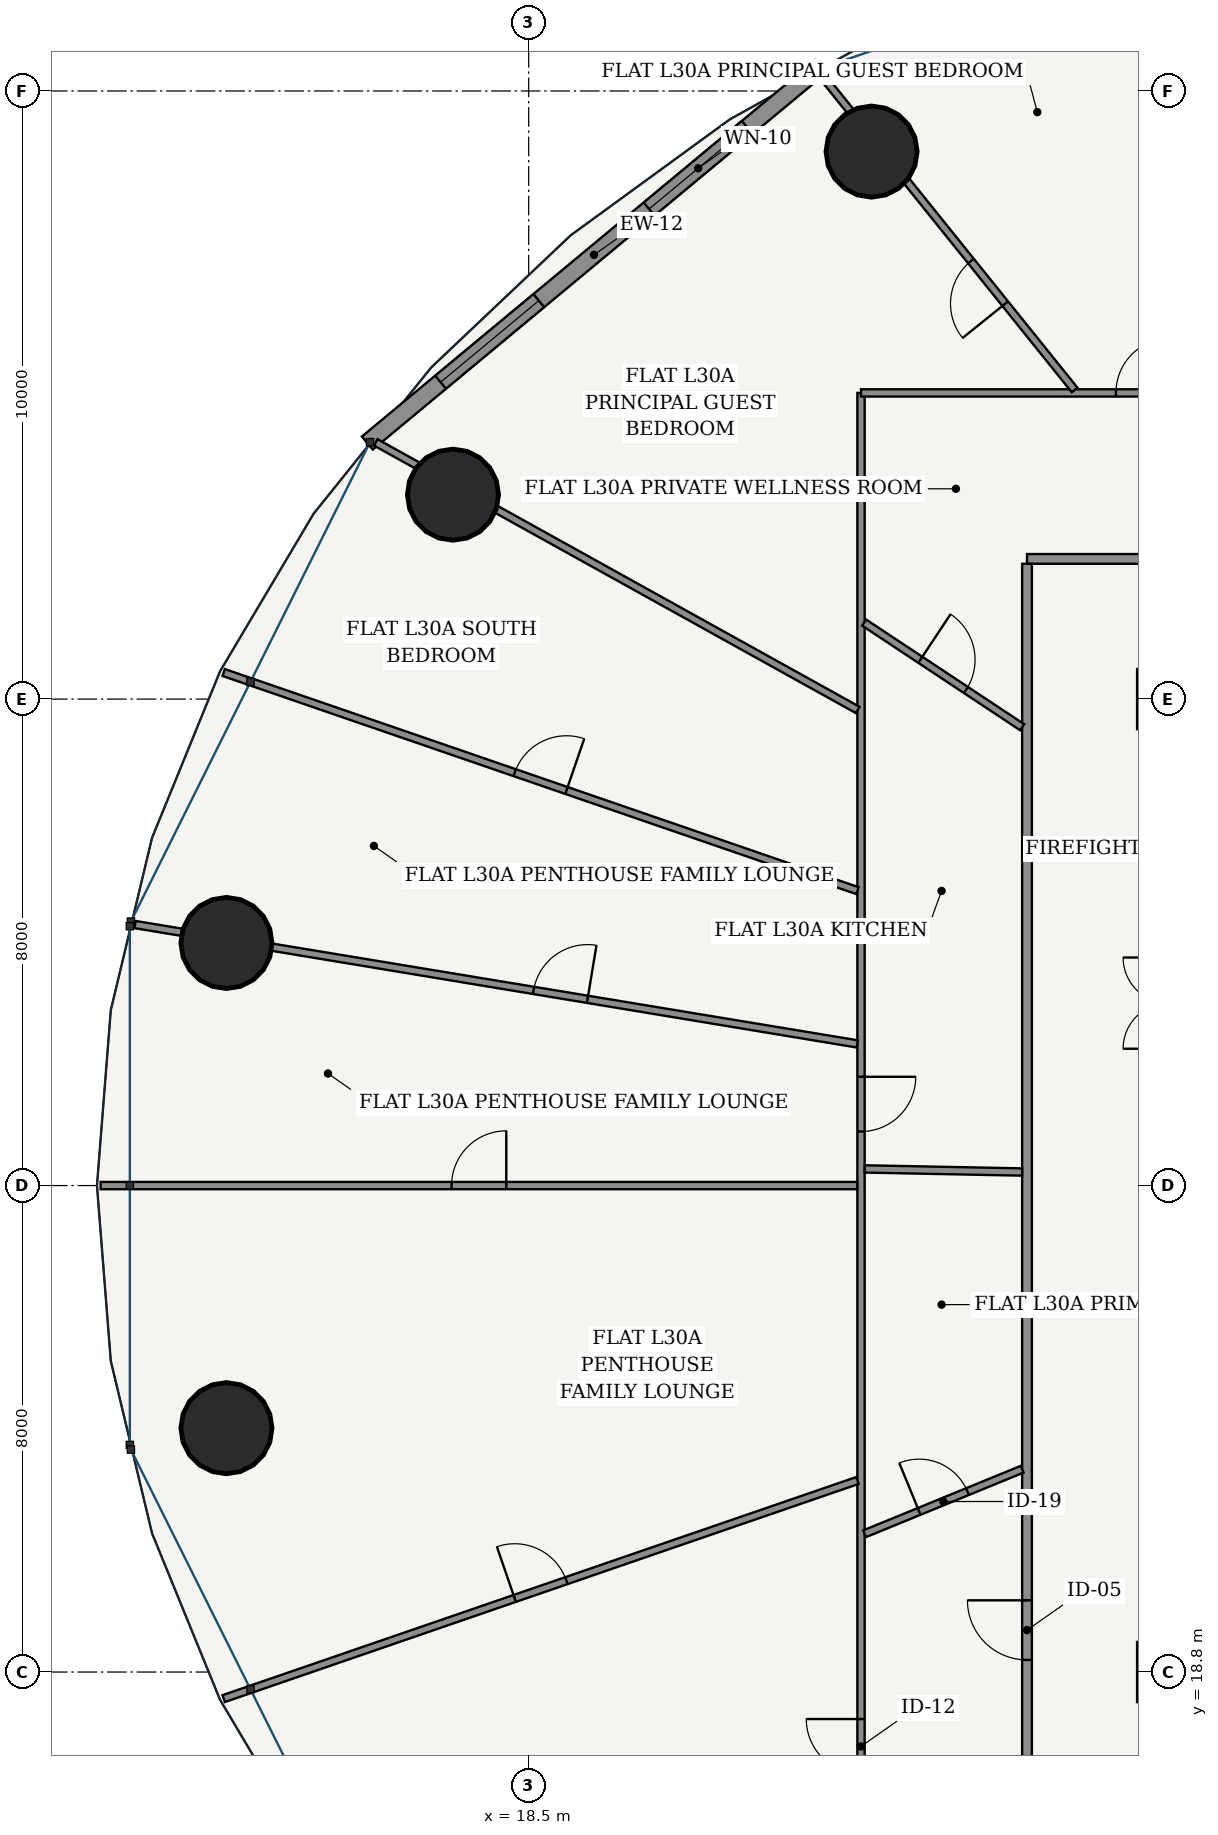
"""IFC4 building model, lengths in metres.
Left out: names, types, materials, properties, quantities, classifications, styles, units other than length and angle.
Written with IfcOpenShell. Run it as: python <this file> out.ifc"""

import sys

from ifc_helpers import new_model, si_unit, direction, frame, frame_2d, origin, origin_2d, place, context, subcontext, project, spatial, rectangle, hollow_circle, extrude, source, transform, mapped, element, fill, save


model = new_model("IFC4")
c1 = context("Model", 3, precision=1e-05, world=origin(), true_north=direction((-0.2419218956, 0.970295726276)))
c2 = subcontext(c1, "Body", "Model", "MODEL_VIEW")
j1 = project(units=[si_unit("LENGTHUNIT", "METRE"), si_unit("PLANEANGLEUNIT", "RADIAN")], contexts=[c1])
p1 = place(None, origin())
s1 = spatial("IfcSite", under=j1, at=p1, CompositionType="ELEMENT")
p2 = place(p1, origin())
s2 = spatial("IfcBuilding", under=s1, at=p2, CompositionType="ELEMENT")
p3 = place(p2, frame((0.0, 0.0, 115.8)))
s3 = spatial("IfcBuildingStorey", under=s2, at=p3, CompositionType="ELEMENT", Elevation=115.8)
for number, where, z_axis, x_axis in (
    (1, (24.138, 43.803, 0.0), (0.0, 0.0, 1.0), (1.0, 0.0, 0.0)),
    (2, (17.255, 38.161, 0.0), (0.0, 0.0, 1.0), (1.0, 0.0, 0.0)),
    (3, (13.529, 30.79, 0.0), (0.0, 0.0, 1.0), (1.0, 0.0, 0.0)),
    (4, (13.529, 22.81, 0.0), (0.0, 0.0, 1.0), (1.0, 0.0, 0.0)),
):
    element("IfcColumn", number, at=place(p3, frame(where, z_axis=z_axis, x_axis=x_axis)), inside=s3, PredefinedType="COLUMN", context=c2, shape_type="SweptSolid", body=[
        extrude(hollow_circle(Radius=0.75, WallThickness=0.045, at=origin_2d()), origin(), (0.0, 0.0, 1.0), 3.6),
    ])
p4 = place(p3, frame((23.3, 45.202, 0.0), z_axis=(0.0, 0.0, 1.0), x_axis=(-0.769242574941, -0.638956853706, 0.0)))
e5 = element("IfcWall", 5, at=p4, inside=s3, PredefinedType="SOLIDWALL", context=c2, shape_type="SweptSolid", body=[
    extrude(rectangle(XDim=9.69, YDim=0.28, at=frame_2d((4.845, 0.0))), origin(), (0.0, 0.0, 1.0), 3.325),
])
p5 = place(p4, frame((1.566, 0.0, 0.85)))
e6 = element("IfcOpeningElement", 6, at=p5, cuts=e5, PredefinedType="OPENING", context=c2, shape_type="SweptSolid", body=[
    extrude(rectangle(XDim=2.1, YDim=1.95, at=frame_2d((1.05, 0.975))), frame((0.0, 0.15, 0.0), z_axis=(0.0, -1.0, 0.0), x_axis=(1.0, 0.0, 0.0)), (0.0, 0.0, 1.0), 0.3),
])
p6 = place(p4, frame((6.023, 0.0, 0.85)))
e7 = element("IfcOpeningElement", 7, at=p6, cuts=e5, PredefinedType="OPENING", context=c2, shape_type="SweptSolid", body=[
    extrude(rectangle(XDim=2.1, YDim=1.95, at=frame_2d((1.05, 0.975))), frame((0.0, 0.15, 0.0), z_axis=(0.0, -1.0, 0.0), x_axis=(1.0, 0.0, 0.0)), (0.0, 0.0, 1.0), 0.3),
])
p7 = place(p3, frame((26.695, 37.105, 0.0), z_axis=(0.0, 0.0, 1.0), x_axis=(1.0, 0.0, 0.0)))
e8 = element("IfcWall", 8, at=p7, inside=s3, PredefinedType="PARTITIONING", context=c2, shape_type="SweptSolid", body=[
    extrude(rectangle(XDim=22.61, YDim=0.16, at=frame_2d((11.305, 0.0))), origin(), (0.0, 0.0, 1.0), 2.767),
])
p8 = place(p3, frame((26.695, 16.575, 0.0), z_axis=(0.0, 0.0, 1.0), x_axis=(0.0, 1.0, 0.0)))
e9 = element("IfcWall", 9, at=p8, inside=s3, PredefinedType="PARTITIONING", context=c2, shape_type="SweptSolid", body=[
    extrude(rectangle(XDim=20.45, YDim=0.16, at=frame_2d((10.225, 0.0))), origin(), (0.0, 0.0, 1.0), 2.767),
])
p9 = place(p8, frame((2.424, 0.0, 0.0)))
e10 = element("IfcOpeningElement", 10, at=p9, cuts=e9, PredefinedType="OPENING", context=c2, shape_type="SweptSolid", body=[
    extrude(rectangle(XDim=0.98, YDim=2.2, at=frame_2d((0.49, 1.1))), frame((0.0, 0.09, 0.0), z_axis=(0.0, -1.0, 0.0), x_axis=(1.0, 0.0, 0.0)), (0.0, 0.0, 1.0), 0.18),
])
p10 = place(p3, frame((23.965, 13.765, 0.0), z_axis=(0.0, 0.0, 1.0), x_axis=(0.0, 1.0, 0.0)))
e11 = element("IfcWall", 11, at=p10, inside=s3, PredefinedType="PARTITIONING", context=c2, shape_type="SweptSolid", body=[
    extrude(rectangle(XDim=26.07, YDim=0.12, at=frame_2d((13.035, 0.0))), origin(), (0.0, 0.0, 1.0), 2.767),
])
p11 = place(p10, frame((3.362, 0.0, 0.0)))
e12 = element("IfcOpeningElement", 12, at=p11, cuts=e11, PredefinedType="OPENING", context=c2, shape_type="SweptSolid", body=[
    extrude(rectangle(XDim=0.9, YDim=2.15, at=frame_2d((0.45, 1.075))), frame((0.0, 0.07, 0.0), z_axis=(0.0, -1.0, 0.0), x_axis=(1.0, 0.0, 0.0)), (0.0, 0.0, 1.0), 0.14),
])
p12 = place(p10, frame((13.924, 0.0, 0.0)))
e13 = element("IfcOpeningElement", 13, at=p12, cuts=e11, PredefinedType="OPENING", context=c2, shape_type="SweptSolid", body=[
    extrude(rectangle(XDim=0.9, YDim=2.15, at=frame_2d((0.45, 1.075))), frame((0.0, 0.07, 0.0), z_axis=(0.0, -1.0, 0.0), x_axis=(1.0, 0.0, 0.0)), (0.0, 0.0, 1.0), 0.14),
])
p13 = place(p3, frame((23.965, 39.835, 0.0), z_axis=(0.0, 0.0, 1.0), x_axis=(1.0, 0.0, 0.0)))
e14 = element("IfcWall", 14, at=p13, inside=s3, PredefinedType="PARTITIONING", context=c2, shape_type="SweptSolid", body=[
    extrude(rectangle(XDim=24.416, YDim=0.12, at=frame_2d((12.208, 0.0))), origin(), (0.0, 0.0, 1.0), 2.767),
])
p14 = place(p13, frame((4.192, 0.0, 0.0)))
e15 = element("IfcOpeningElement", 15, at=p14, cuts=e14, PredefinedType="OPENING", context=c2, shape_type="SweptSolid", body=[
    extrude(rectangle(XDim=0.9, YDim=2.15, at=frame_2d((0.45, 1.075))), frame((0.0, 0.07, 0.0), z_axis=(0.0, -1.0, 0.0), x_axis=(1.0, 0.0, 0.0)), (0.0, 0.0, 1.0), 0.14),
])
p15 = place(p13, frame((19.728, 0.0, 0.0)))
e16 = element("IfcOpeningElement", 16, at=p15, cuts=e14, PredefinedType="OPENING", context=c2, shape_type="SweptSolid", body=[
    extrude(rectangle(XDim=0.86, YDim=2.15, at=frame_2d((0.43, 1.075))), frame((0.0, 0.07, 0.0), z_axis=(0.0, -1.0, 0.0), x_axis=(1.0, 0.0, 0.0)), (0.0, 0.0, 1.0), 0.14),
])
p16 = place(p3, frame((31.474, 39.89, 0.0), z_axis=(0.0, 0.0, 1.0), x_axis=(-0.446167584581, 0.894949432353, 0.0)))
e17 = element("IfcWall", 17, at=p16, inside=s3, PredefinedType="PARTITIONING", context=c2, shape_type="SweptSolid", body=[
    extrude(rectangle(XDim=8.125, YDim=0.12, at=frame_2d((4.062, 0.0))), origin(), (0.0, 0.0, 1.0), 2.767),
])
p17 = place(p16, frame((3.612, 0.0, 0.0)))
e18 = element("IfcOpeningElement", 18, at=p17, cuts=e17, PredefinedType="OPENING", context=c2, shape_type="SweptSolid", body=[
    extrude(rectangle(XDim=0.9, YDim=2.15, at=frame_2d((0.45, 1.075))), frame((0.0, 0.07, 0.0), z_axis=(0.0, -1.0, 0.0), x_axis=(1.0, 0.0, 0.0)), (0.0, 0.0, 1.0), 0.14),
])
p18 = place(p3, frame((27.478, 39.883, 0.0), z_axis=(0.0, 0.0, 1.0), x_axis=(-0.62672583251, 0.779239841682, 0.0)))
e19 = element("IfcWall", 19, at=p18, inside=s3, PredefinedType="PARTITIONING", context=c2, shape_type="SweptSolid", body=[
    extrude(rectangle(XDim=6.678, YDim=0.12, at=frame_2d((3.339, 0.0))), origin(), (0.0, 0.0, 1.0), 2.767),
])
p19 = place(p18, frame((1.821, 0.0, 0.0)))
e20 = element("IfcOpeningElement", 20, at=p19, cuts=e19, PredefinedType="OPENING", context=c2, shape_type="SweptSolid", body=[
    extrude(rectangle(XDim=0.9, YDim=2.15, at=frame_2d((0.45, 1.075))), frame((0.0, 0.07, 0.0), z_axis=(0.0, -1.0, 0.0), x_axis=(1.0, 0.0, 0.0)), (0.0, 0.0, 1.0), 0.14),
])
p20 = place(p3, frame((23.911, 34.622, 0.0), z_axis=(0.0, 0.0, 1.0), x_axis=(-0.874324904351, 0.485341077626, 0.0)))
e21 = element("IfcWall", 21, at=p20, inside=s3, PredefinedType="PARTITIONING", context=c2, shape_type="SweptSolid", body=[
    extrude(rectangle(XDim=9.066, YDim=0.12, at=frame_2d((4.533, 0.0))), origin(), (0.0, 0.0, 1.0), 2.767),
])
p21 = place(p3, frame((23.906, 31.65, 0.0), z_axis=(0.0, 0.0, 1.0), x_axis=(-0.945573120726, 0.32540970078, 0.0)))
e22 = element("IfcWall", 22, at=p21, inside=s3, PredefinedType="PARTITIONING", context=c2, shape_type="SweptSolid", body=[
    extrude(rectangle(XDim=11.022, YDim=0.12, at=frame_2d((5.511, 0.0))), origin(), (0.0, 0.0, 1.0), 2.767),
])
p22 = place(p21, frame((5.061, 0.0, 0.0)))
e23 = element("IfcOpeningElement", 23, at=p22, cuts=e22, PredefinedType="OPENING", context=c2, shape_type="SweptSolid", body=[
    extrude(rectangle(XDim=0.9, YDim=2.15, at=frame_2d((0.45, 1.075))), frame((0.0, 0.07, 0.0), z_axis=(0.0, -1.0, 0.0), x_axis=(1.0, 0.0, 0.0)), (0.0, 0.0, 1.0), 0.14),
])
p23 = place(p3, frame((23.904, 29.13, 0.0), z_axis=(0.0, 0.0, 1.0), x_axis=(-0.986618264768, 0.163047231274, 0.0)))
e24 = element("IfcWall", 24, at=p23, inside=s3, PredefinedType="PARTITIONING", context=c2, shape_type="SweptSolid", body=[
    extrude(rectangle(XDim=12.039, YDim=0.12, at=frame_2d((6.02, 0.0))), origin(), (0.0, 0.0, 1.0), 2.767),
])
p24 = place(p23, frame((4.496, 0.0, 0.0)))
e25 = element("IfcOpeningElement", 25, at=p24, cuts=e24, PredefinedType="OPENING", context=c2, shape_type="SweptSolid", body=[
    extrude(rectangle(XDim=0.9, YDim=2.15, at=frame_2d((0.45, 1.075))), frame((0.0, 0.07, 0.0), z_axis=(0.0, -1.0, 0.0), x_axis=(1.0, 0.0, 0.0)), (0.0, 0.0, 1.0), 0.14),
])
p25 = place(p3, frame((23.903, 26.8, 0.0), z_axis=(0.0, 0.0, 1.0), x_axis=(-1.0, 0.0, 0.0)))
e26 = element("IfcWall", 26, at=p25, inside=s3, PredefinedType="PARTITIONING", context=c2, shape_type="SweptSolid", body=[
    extrude(rectangle(XDim=12.443, YDim=0.12, at=frame_2d((6.222, 0.0))), origin(), (0.0, 0.0, 1.0), 2.767),
])
p26 = place(p25, frame((5.771, 0.0, 0.0)))
e27 = element("IfcOpeningElement", 27, at=p26, cuts=e26, PredefinedType="OPENING", context=c2, shape_type="SweptSolid", body=[
    extrude(rectangle(XDim=0.9, YDim=2.15, at=frame_2d((0.45, 1.075))), frame((0.0, 0.07, 0.0), z_axis=(0.0, -1.0, 0.0), x_axis=(1.0, 0.0, 0.0)), (0.0, 0.0, 1.0), 0.14),
])
p27 = place(p3, frame((23.906, 21.95, 0.0), z_axis=(0.0, 0.0, 1.0), x_axis=(-0.945573120726, -0.32540970078, 0.0)))
e28 = element("IfcWall", 28, at=p27, inside=s3, PredefinedType="PARTITIONING", context=c2, shape_type="SweptSolid", body=[
    extrude(rectangle(XDim=11.022, YDim=0.12, at=frame_2d((5.511, 0.0))), origin(), (0.0, 0.0, 1.0), 2.767),
])
p28 = place(p27, frame((5.061, 0.0, 0.0)))
e29 = element("IfcOpeningElement", 29, at=p28, cuts=e28, PredefinedType="OPENING", context=c2, shape_type="SweptSolid", body=[
    extrude(rectangle(XDim=0.9, YDim=2.15, at=frame_2d((0.45, 1.075))), frame((0.0, 0.07, 0.0), z_axis=(0.0, -1.0, 0.0), x_axis=(1.0, 0.0, 0.0)), (0.0, 0.0, 1.0), 0.14),
])
p29 = place(p3, frame((26.615, 34.337, 0.0), z_axis=(0.0, 0.0, 1.0), x_axis=(-0.833829855758, 0.552021531868, 0.0)))
e30 = element("IfcWall", 30, at=p29, inside=s3, PredefinedType="PARTITIONING", context=c2, shape_type="SweptSolid", body=[
    extrude(rectangle(XDim=3.116, YDim=0.12, at=frame_2d((1.558, 0.0))), origin(), (0.0, 0.0, 1.0), 3.325),
])
p30 = place(p29, frame((1.108, 0.0, 0.0)))
e31 = element("IfcOpeningElement", 31, at=p30, cuts=e30, PredefinedType="OPENING", context=c2, shape_type="SweptSolid", body=[
    extrude(rectangle(XDim=0.9, YDim=2.15, at=frame_2d((0.45, 1.075))), frame((0.0, 0.07, 0.0), z_axis=(0.0, -1.0, 0.0), x_axis=(1.0, 0.0, 0.0)), (0.0, 0.0, 1.0), 0.14),
])
p31 = place(p3, frame((26.615, 27.023, 0.0), z_axis=(0.0, 0.0, 1.0), x_axis=(-0.999809377232, 0.019524579348, 0.0)))
e32 = element("IfcWall", 32, at=p31, inside=s3, PredefinedType="PARTITIONING", context=c2, shape_type="SweptSolid", body=[
    extrude(rectangle(XDim=2.588, YDim=0.12, at=frame_2d((1.294, 0.0))), origin(), (0.0, 0.0, 1.0), 3.325),
])
p32 = place(p3, frame((26.615, 22.135, 0.0), z_axis=(0.0, 0.0, 1.0), x_axis=(-0.925337216259, -0.379145138708, 0.0)))
e33 = element("IfcWall", 33, at=p32, inside=s3, PredefinedType="PARTITIONING", context=c2, shape_type="SweptSolid", body=[
    extrude(rectangle(XDim=2.802, YDim=0.12, at=frame_2d((1.401, 0.0))), origin(), (0.0, 0.0, 1.0), 3.325),
])
p33 = place(p32, frame((0.971, 0.0, 0.0)))
e34 = element("IfcOpeningElement", 34, at=p33, cuts=e33, PredefinedType="OPENING", context=c2, shape_type="SweptSolid", body=[
    extrude(rectangle(XDim=0.86, YDim=2.15, at=frame_2d((0.43, 1.075))), frame((0.0, 0.07, 0.0), z_axis=(0.0, -1.0, 0.0), x_axis=(1.0, 0.0, 0.0)), (0.0, 0.0, 1.0), 0.14),
])
m1 = source(origin(), c2, "Body", "SweptSolid", [
    extrude(rectangle(XDim=2.1, YDim=1.95, at=frame_2d((1.05, 0.975))), frame((0.0, 0.03, 0.0), z_axis=(0.0, -1.0, 0.0), x_axis=(1.0, 0.0, 0.0)), (0.0, 0.0, 1.0), 0.06),
])
p34 = place(p5, origin())
e35 = element("IfcWindow", 35, at=p34, inside=s3, PartitioningType="SINGLE_PANEL", PredefinedType="WINDOW", context=c2, shape_type="MappedRepresentation", body=[
    mapped(m1, transform((0.0, 0.0, 0.0), scale=1.0)),
])
fill(e6, e35)
p35 = place(p6, origin())
e36 = element("IfcWindow", 36, at=p35, inside=s3, PartitioningType="SINGLE_PANEL", PredefinedType="WINDOW", context=c2, shape_type="MappedRepresentation", body=[
    mapped(m1, transform((0.0, 0.0, 0.0), scale=1.0)),
])
fill(e7, e36)
m2 = source(origin(), c2, "Body", "SweptSolid", [
    extrude(rectangle(XDim=0.98, YDim=2.2, at=frame_2d((0.49, 1.1))), frame((0.0, 0.025, 0.0), z_axis=(0.0, -1.0, 0.0), x_axis=(1.0, 0.0, 0.0)), (0.0, 0.0, 1.0), 0.05),
])
p36 = place(p9, origin())
e37 = element("IfcDoor", 37, at=p36, inside=s3, OperationType="SINGLE_SWING_RIGHT", PredefinedType="DOOR", context=c2, shape_type="MappedRepresentation", body=[
    mapped(m2, transform((0.0, 0.0, 0.0), scale=1.0)),
])
fill(e10, e37)
m3 = source(origin(), c2, "Body", "SweptSolid", [
    extrude(rectangle(XDim=0.86, YDim=2.15, at=frame_2d((0.43, 1.075))), frame((0.0, 0.025, 0.0), z_axis=(0.0, -1.0, 0.0), x_axis=(1.0, 0.0, 0.0)), (0.0, 0.0, 1.0), 0.05),
])
p37 = place(p33, frame((0.86, 0.0, 0.0), z_axis=(0.0, 0.0, 1.0), x_axis=(-1.0, 0.0, 0.0)))
e38 = element("IfcDoor", 38, at=p37, inside=s3, OperationType="SINGLE_SWING_LEFT", PredefinedType="DOOR", context=c2, shape_type="MappedRepresentation", body=[
    mapped(m3, transform((0.0, 0.0, 0.0), scale=1.0)),
])
fill(e34, e38)
m4 = source(origin(), c2, "Body", "SweptSolid", [
    extrude(rectangle(XDim=0.9, YDim=2.15, at=frame_2d((0.45, 1.075))), frame((0.0, 0.025, 0.0), z_axis=(0.0, -1.0, 0.0), x_axis=(1.0, 0.0, 0.0)), (0.0, 0.0, 1.0), 0.05),
])
p38 = place(p11, origin())
e39 = element("IfcDoor", 39, at=p38, inside=s3, OperationType="SINGLE_SWING_RIGHT", PredefinedType="DOOR", context=c2, shape_type="MappedRepresentation", body=[
    mapped(m4, transform((0.0, 0.0, 0.0), scale=1.0)),
])
fill(e12, e39)
p39 = place(p28, frame((0.9, 0.0, 0.0), z_axis=(0.0, 0.0, 1.0), x_axis=(-1.0, 0.0, 0.0)))
e40 = element("IfcDoor", 40, at=p39, inside=s3, OperationType="SINGLE_SWING_LEFT", PredefinedType="DOOR", context=c2, shape_type="MappedRepresentation", body=[
    mapped(m4, transform((0.0, 0.0, 0.0), scale=1.0)),
])
fill(e29, e40)
p40 = place(p26, frame((0.9, 0.0, 0.0), z_axis=(0.0, 0.0, 1.0), x_axis=(-1.0, 0.0, 0.0)))
e41 = element("IfcDoor", 41, at=p40, inside=s3, OperationType="SINGLE_SWING_RIGHT", PredefinedType="DOOR", context=c2, shape_type="MappedRepresentation", body=[
    mapped(m4, transform((0.0, 0.0, 0.0), scale=1.0)),
])
fill(e27, e41)
p41 = place(p12, frame((0.9, 0.0, 0.0), z_axis=(0.0, 0.0, 1.0), x_axis=(-1.0, 0.0, 0.0)))
e42 = element("IfcDoor", 42, at=p41, inside=s3, OperationType="SINGLE_SWING_LEFT", PredefinedType="DOOR", context=c2, shape_type="MappedRepresentation", body=[
    mapped(m4, transform((0.0, 0.0, 0.0), scale=1.0)),
])
fill(e13, e42)
p42 = place(p24, frame((0.9, 0.0, 0.0), z_axis=(0.0, 0.0, 1.0), x_axis=(-1.0, 0.0, 0.0)))
e43 = element("IfcDoor", 43, at=p42, inside=s3, OperationType="SINGLE_SWING_RIGHT", PredefinedType="DOOR", context=c2, shape_type="MappedRepresentation", body=[
    mapped(m4, transform((0.0, 0.0, 0.0), scale=1.0)),
])
fill(e25, e43)
p43 = place(p30, frame((0.9, 0.0, 0.0), z_axis=(0.0, 0.0, 1.0), x_axis=(-1.0, 0.0, 0.0)))
e44 = element("IfcDoor", 44, at=p43, inside=s3, OperationType="SINGLE_SWING_LEFT", PredefinedType="DOOR", context=c2, shape_type="MappedRepresentation", body=[
    mapped(m4, transform((0.0, 0.0, 0.0), scale=1.0)),
])
fill(e31, e44)
p44 = place(p14, origin())
e45 = element("IfcDoor", 45, at=p44, inside=s3, OperationType="SINGLE_SWING_RIGHT", PredefinedType="DOOR", context=c2, shape_type="MappedRepresentation", body=[
    mapped(m4, transform((0.0, 0.0, 0.0), scale=1.0)),
])
fill(e15, e45)
p45 = place(p19, origin())
e46 = element("IfcDoor", 46, at=p45, inside=s3, OperationType="SINGLE_SWING_LEFT", PredefinedType="DOOR", context=c2, shape_type="MappedRepresentation", body=[
    mapped(m4, transform((0.0, 0.0, 0.0), scale=1.0)),
])
fill(e20, e46)
p46 = place(p22, frame((0.9, 0.0, 0.0), z_axis=(0.0, 0.0, 1.0), x_axis=(-1.0, 0.0, 0.0)))
e47 = element("IfcDoor", 47, at=p46, inside=s3, OperationType="SINGLE_SWING_RIGHT", PredefinedType="DOOR", context=c2, shape_type="MappedRepresentation", body=[
    mapped(m4, transform((0.0, 0.0, 0.0), scale=1.0)),
])
fill(e23, e47)
save(model, sys.argv[1])
